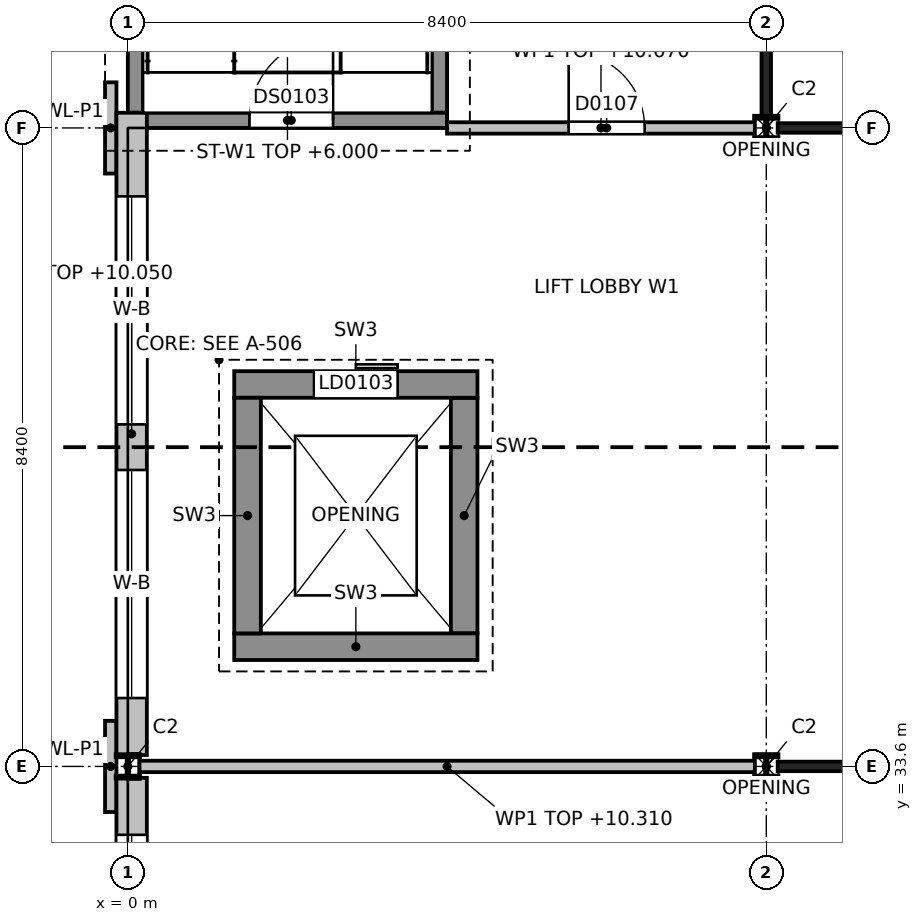
"""IFC4 building model, lengths in metres.
Left out: names, types, materials, properties, quantities, classifications, styles, units other than length and angle.
Written with IfcOpenShell. Run it as: python <this file> out.ifc"""

import sys

from ifc_helpers import new_model, si_unit, direction, frame, frame_2d, origin, origin_2d, place, context, subcontext, project, spatial, rectangle, i_section, extrude, element, fill, save


model = new_model("IFC4")
c1 = context("Model", 3, precision=1e-05, world=origin(), true_north=direction((0.0, 1.0)))
c2 = subcontext(c1, "Body", "Model", "MODEL_VIEW")
j1 = project(units=[si_unit("LENGTHUNIT", "METRE"), si_unit("PLANEANGLEUNIT", "RADIAN")], contexts=[c1])
p1 = place(None, origin())
s1 = spatial("IfcSite", under=j1, at=p1, CompositionType="ELEMENT")
p2 = place(p1, origin())
s2 = spatial("IfcBuilding", under=s1, at=p2, CompositionType="ELEMENT")
p3 = place(p2, frame((0.0, 0.0, 6.0)))
s3 = spatial("IfcBuildingStorey", under=s2, at=p3, CompositionType="ELEMENT", Elevation=6.0)
for number, where, z_axis, x_axis in (
    (1, (0.0, 33.6, 0.0), (0.0, 0.0, 1.0), (1.0, 0.0, 0.0)),
    (2, (8.4, 33.6, 0.0), (0.0, 0.0, 1.0), (1.0, 0.0, 0.0)),
    (3, (8.4, 42.0, 0.0), (0.0, 0.0, 1.0), (1.0, 0.0, 0.0)),
):
    element("IfcColumn", number, at=place(p3, frame(where, z_axis=z_axis, x_axis=x_axis)), inside=s3, PredefinedType="COLUMN", context=c2, shape_type="SweptSolid", body=[
        extrude(i_section(OverallWidth=0.3, OverallDepth=0.3, WebThickness=0.011, FlangeThickness=0.019, at=origin_2d()), origin(), (0.0, 0.0, 1.0), 4.8),
    ])
p4 = place(p3, frame((0.0, 42.1, 0.0), z_axis=(0.0, 0.0, 1.0), x_axis=(1.0, 0.0, 0.0)))
e4 = element("IfcWall", 4, at=p4, inside=s3, PredefinedType="SHEAR", context=c2, shape_type="SweptSolid", body=[
    extrude(rectangle(XDim=4.2, YDim=0.2, at=frame_2d((2.1, 0.0))), origin(), (0.0, 0.0, 1.0), 4.8),
])
p5 = place(p4, frame((1.6, 0.0, 0.0)))
e5 = element("IfcOpeningElement", 5, at=p5, cuts=e4, PredefinedType="OPENING", context=c2, shape_type="SweptSolid", body=[
    extrude(rectangle(XDim=1.1, YDim=2.1, at=frame_2d((0.55, 1.05))), frame((0.0, 0.1, 0.0), z_axis=(0.0, -1.0, 0.0), x_axis=(1.0, 0.0, 0.0)), (0.0, 0.0, 1.0), 0.2),
])
for number, where, z_axis, x_axis in (
    (6, (0.1, 42.2, 0.0), (0.0, 0.0, 1.0), (0.0, 1.0, 0.0)),
    (7, (4.1, 42.2, 0.0), (0.0, 0.0, 1.0), (0.0, 1.0, 0.0)),
):
    element("IfcWall", number, at=place(p3, frame(where, z_axis=z_axis, x_axis=x_axis)), inside=s3, PredefinedType="SHEAR", context=c2, shape_type="SweptSolid", body=[
        extrude(rectangle(XDim=8.0, YDim=0.2, at=frame_2d((4.0, 0.0))), origin(), (0.0, 0.0, 1.0), 4.8),
    ])
p6 = place(p3, frame((1.4, 35.175, 0.0), z_axis=(0.0, 0.0, 1.0), x_axis=(1.0, 0.0, 0.0)))
e8 = element("IfcWall", 8, at=p6, inside=s3, PredefinedType="SHEAR", context=c2, shape_type="SweptSolid", body=[
    extrude(rectangle(XDim=3.2, YDim=0.35, at=frame_2d((1.6, 0.0))), origin(), (0.0, 0.0, 1.0), 4.8),
])
p7 = place(p3, frame((1.4, 38.625, 0.0), z_axis=(0.0, 0.0, 1.0), x_axis=(1.0, 0.0, 0.0)))
e9 = element("IfcWall", 9, at=p7, inside=s3, PredefinedType="SHEAR", context=c2, shape_type="SweptSolid", body=[
    extrude(rectangle(XDim=3.2, YDim=0.35, at=frame_2d((1.6, 0.0))), origin(), (0.0, 0.0, 1.0), 4.8),
])
p8 = place(p7, frame((1.05, 0.0, 0.0)))
e10 = element("IfcOpeningElement", 10, at=p8, cuts=e9, PredefinedType="OPENING", context=c2, shape_type="SweptSolid", body=[
    extrude(rectangle(XDim=1.1, YDim=2.1, at=frame_2d((0.55, 1.05))), frame((0.0, 0.175, 0.0), z_axis=(0.0, -1.0, 0.0), x_axis=(1.0, 0.0, 0.0)), (0.0, 0.0, 1.0), 0.35),
])
for number, where, z_axis, x_axis in (
    (11, (1.575, 35.35, 0.0), (0.0, 0.0, 1.0), (0.0, 1.0, 0.0)),
    (12, (4.425, 35.35, 0.0), (0.0, 0.0, 1.0), (0.0, 1.0, 0.0)),
):
    element("IfcWall", number, at=place(p3, frame(where, z_axis=z_axis, x_axis=x_axis)), inside=s3, PredefinedType="SHEAR", context=c2, shape_type="SweptSolid", body=[
        extrude(rectangle(XDim=3.1, YDim=0.35, at=frame_2d((1.55, 0.0))), origin(), (0.0, 0.0, 1.0), 4.8),
    ])
p9 = place(p3, frame((0.05, 25.35, 0.0), z_axis=(0.0, 0.0, 1.0), x_axis=(0.0, 1.0, 0.0)))
e13 = element("IfcWall", 13, at=p9, inside=s3, PredefinedType="SOLIDWALL", context=c2, shape_type="SweptSolid", body=[
    extrude(rectangle(XDim=8.1, YDim=0.4, at=frame_2d((4.05, 0.0))), origin(), (0.0, 0.0, 1.0), 4.05),
])
p10 = place(p9, frame((0.75, 0.0, 0.9)))
e14 = element("IfcOpeningElement", 14, at=p10, cuts=e13, PredefinedType="OPENING", context=c2, shape_type="SweptSolid", body=[
    extrude(rectangle(XDim=3.0, YDim=3.0, at=frame_2d((1.5, 1.5))), frame((0.0, 0.2, 0.0), z_axis=(0.0, -1.0, 0.0), x_axis=(1.0, 0.0, 0.0)), (0.0, 0.0, 1.0), 0.4),
])
p11 = place(p9, frame((4.35, 0.0, 0.9)))
e15 = element("IfcOpeningElement", 15, at=p11, cuts=e13, PredefinedType="OPENING", context=c2, shape_type="SweptSolid", body=[
    extrude(rectangle(XDim=3.0, YDim=3.0, at=frame_2d((1.5, 1.5))), frame((0.0, 0.2, 0.0), z_axis=(0.0, -1.0, 0.0), x_axis=(1.0, 0.0, 0.0)), (0.0, 0.0, 1.0), 0.4),
])
p12 = place(p3, frame((0.05, 33.75, 0.0), z_axis=(0.0, 0.0, 1.0), x_axis=(0.0, 1.0, 0.0)))
e16 = element("IfcWall", 16, at=p12, inside=s3, PredefinedType="SOLIDWALL", context=c2, shape_type="SweptSolid", body=[
    extrude(rectangle(XDim=8.45, YDim=0.4, at=frame_2d((4.225, 0.0))), origin(), (0.0, 0.0, 1.0), 4.05),
])
p13 = place(p12, frame((0.75, 0.0, 0.9)))
e17 = element("IfcOpeningElement", 17, at=p13, cuts=e16, PredefinedType="OPENING", context=c2, shape_type="SweptSolid", body=[
    extrude(rectangle(XDim=3.0, YDim=3.0, at=frame_2d((1.5, 1.5))), frame((0.0, 0.2, 0.0), z_axis=(0.0, -1.0, 0.0), x_axis=(1.0, 0.0, 0.0)), (0.0, 0.0, 1.0), 0.4),
])
p14 = place(p12, frame((4.35, 0.0, 0.9)))
e18 = element("IfcOpeningElement", 18, at=p14, cuts=e16, PredefinedType="OPENING", context=c2, shape_type="SweptSolid", body=[
    extrude(rectangle(XDim=3.0, YDim=3.0, at=frame_2d((1.5, 1.5))), frame((0.0, 0.2, 0.0), z_axis=(0.0, -1.0, 0.0), x_axis=(1.0, 0.0, 0.0)), (0.0, 0.0, 1.0), 0.4),
])
p15 = place(p3, frame((-0.225, 33.0, 0.0), z_axis=(0.0, 0.0, 1.0), x_axis=(0.0, 1.0, 0.0)))
e19 = element("IfcWall", 19, at=p15, inside=s3, PredefinedType="SOLIDWALL", context=c2, shape_type="SweptSolid", body=[
    extrude(rectangle(XDim=1.2, YDim=0.15, at=frame_2d((0.6, 0.0))), origin(), (0.0, 0.0, 1.0), 4.8),
])
p16 = place(p3, frame((-0.225, 41.4, 0.0), z_axis=(0.0, 0.0, 1.0), x_axis=(0.0, 1.0, 0.0)))
e20 = element("IfcWall", 20, at=p16, inside=s3, PredefinedType="SOLIDWALL", context=c2, shape_type="SweptSolid", body=[
    extrude(rectangle(XDim=1.2, YDim=0.15, at=frame_2d((0.6, 0.0))), origin(), (0.0, 0.0, 1.0), 4.8),
])
p17 = place(p3, frame((0.15, 33.6, 0.0), z_axis=(0.0, 0.0, 1.0), x_axis=(1.0, 0.0, 0.0)))
e21 = element("IfcWall", 21, at=p17, inside=s3, PredefinedType="PARTITIONING", context=c2, shape_type="SweptSolid", body=[
    extrude(rectangle(XDim=8.1, YDim=0.15, at=frame_2d((4.05, 0.0))), origin(), (0.0, 0.0, 1.0), 4.31),
])
p18 = place(p3, frame((8.55, 33.6, 0.0), z_axis=(0.0, 0.0, 1.0), x_axis=(1.0, 0.0, 0.0)))
e22 = element("IfcWall", 22, at=p18, inside=s3, PredefinedType="PARTITIONING", context=c2, shape_type="SweptSolid", body=[
    extrude(rectangle(XDim=4.05, YDim=0.125, at=frame_2d((2.025, 0.0))), origin(), (0.0, 0.0, 1.0), 4.31),
])
p19 = place(p18, frame((1.45, 0.0, 0.0)))
e23 = element("IfcOpeningElement", 23, at=p19, cuts=e22, PredefinedType="OPENING", context=c2, shape_type="SweptSolid", body=[
    extrude(rectangle(XDim=1.0, YDim=2.2, at=frame_2d((0.5, 1.1))), frame((0.0, 0.062, 0.0), z_axis=(0.0, -1.0, 0.0), x_axis=(1.0, 0.0, 0.0)), (0.0, 0.0, 1.0), 0.125),
])
p20 = place(p3, frame((4.2, 42.0, 0.0), z_axis=(0.0, 0.0, 1.0), x_axis=(1.0, 0.0, 0.0)))
e24 = element("IfcWall", 24, at=p20, inside=s3, PredefinedType="PARTITIONING", context=c2, shape_type="SweptSolid", body=[
    extrude(rectangle(XDim=4.05, YDim=0.15, at=frame_2d((2.025, 0.0))), origin(), (0.0, 0.0, 1.0), 4.67),
])
p21 = place(p20, frame((1.6, 0.0, 0.0)))
e25 = element("IfcOpeningElement", 25, at=p21, cuts=e24, PredefinedType="OPENING", context=c2, shape_type="SweptSolid", body=[
    extrude(rectangle(XDim=1.0, YDim=2.1, at=frame_2d((0.5, 1.05))), frame((0.0, 0.075, 0.0), z_axis=(0.0, -1.0, 0.0), x_axis=(1.0, 0.0, 0.0)), (0.0, 0.0, 1.0), 0.15),
])
p22 = place(p3, frame((8.55, 42.0, 0.0), z_axis=(0.0, 0.0, 1.0), x_axis=(1.0, 0.0, 0.0)))
e26 = element("IfcWall", 26, at=p22, inside=s3, PredefinedType="PARTITIONING", context=c2, shape_type="SweptSolid", body=[
    extrude(rectangle(XDim=4.05, YDim=0.125, at=frame_2d((2.025, 0.0))), origin(), (0.0, 0.0, 1.0), 4.31),
])
p23 = place(p22, frame((1.45, 0.0, 0.0)))
e27 = element("IfcOpeningElement", 27, at=p23, cuts=e26, PredefinedType="OPENING", context=c2, shape_type="SweptSolid", body=[
    extrude(rectangle(XDim=0.9, YDim=2.1, at=frame_2d((0.45, 1.05))), frame((0.0, 0.062, 0.0), z_axis=(0.0, -1.0, 0.0), x_axis=(1.0, 0.0, 0.0)), (0.0, 0.0, 1.0), 0.125),
])
p24 = place(p3, frame((8.4, 42.15, 0.0), z_axis=(0.0, 0.0, 1.0), x_axis=(0.0, 1.0, 0.0)))
e28 = element("IfcWall", 28, at=p24, inside=s3, PredefinedType="PARTITIONING", context=c2, shape_type="SweptSolid", body=[
    extrude(rectangle(XDim=8.1, YDim=0.125, at=frame_2d((4.05, 0.0))), origin(), (0.0, 0.0, 1.0), 4.28),
])
p25 = place(p11, origin())
e29 = element("IfcWindow", 29, at=p25, inside=s3, PartitioningType="SINGLE_PANEL", PredefinedType="WINDOW", context=c2, shape_type="SweptSolid", body=[
    extrude(rectangle(XDim=3.0, YDim=3.0, at=frame_2d((1.5, 1.5))), frame((0.0, 0.03, 0.0), z_axis=(0.0, -1.0, 0.0), x_axis=(1.0, 0.0, 0.0)), (0.0, 0.0, 1.0), 0.06),
])
fill(e15, e29)
p26 = place(p13, origin())
e30 = element("IfcWindow", 30, at=p26, inside=s3, PartitioningType="SINGLE_PANEL", PredefinedType="WINDOW", context=c2, shape_type="SweptSolid", body=[
    extrude(rectangle(XDim=3.0, YDim=3.0, at=frame_2d((1.5, 1.5))), frame((0.0, 0.03, 0.0), z_axis=(0.0, -1.0, 0.0), x_axis=(1.0, 0.0, 0.0)), (0.0, 0.0, 1.0), 0.06),
])
fill(e17, e30)
p27 = place(p14, origin())
e31 = element("IfcWindow", 31, at=p27, inside=s3, PartitioningType="SINGLE_PANEL", PredefinedType="WINDOW", context=c2, shape_type="SweptSolid", body=[
    extrude(rectangle(XDim=3.0, YDim=3.0, at=frame_2d((1.5, 1.5))), frame((0.0, 0.03, 0.0), z_axis=(0.0, -1.0, 0.0), x_axis=(1.0, 0.0, 0.0)), (0.0, 0.0, 1.0), 0.06),
])
fill(e18, e31)
p28 = place(p21, origin())
e32 = element("IfcDoor", 32, at=p28, inside=s3, OperationType="SINGLE_SWING_LEFT", PredefinedType="DOOR", context=c2, shape_type="SweptSolid", body=[
    extrude(rectangle(XDim=1.0, YDim=2.1, at=frame_2d((0.5, 1.05))), frame((0.0, 0.025, 0.0), z_axis=(0.0, -1.0, 0.0), x_axis=(1.0, 0.0, 0.0)), (0.0, 0.0, 1.0), 0.05),
])
fill(e25, e32)
p29 = place(p5, origin())
e33 = element("IfcDoor", 33, at=p29, inside=s3, OperationType="SINGLE_SWING_RIGHT", PredefinedType="DOOR", context=c2, shape_type="SweptSolid", body=[
    extrude(rectangle(XDim=1.1, YDim=2.1, at=frame_2d((0.55, 1.05))), frame((0.0, 0.025, 0.0), z_axis=(0.0, -1.0, 0.0), x_axis=(1.0, 0.0, 0.0)), (0.0, 0.0, 1.0), 0.05),
])
fill(e5, e33)
p30 = place(p8, origin())
e34 = element("IfcDoor", 34, at=p30, inside=s3, OperationType="SLIDING_TO_LEFT", PredefinedType="DOOR", context=c2, shape_type="SweptSolid", body=[
    extrude(rectangle(XDim=1.1, YDim=2.1, at=frame_2d((0.55, 1.05))), frame((0.0, 0.025, 0.0), z_axis=(0.0, -1.0, 0.0), x_axis=(1.0, 0.0, 0.0)), (0.0, 0.0, 1.0), 0.05),
])
fill(e10, e34)
save(model, sys.argv[1])
